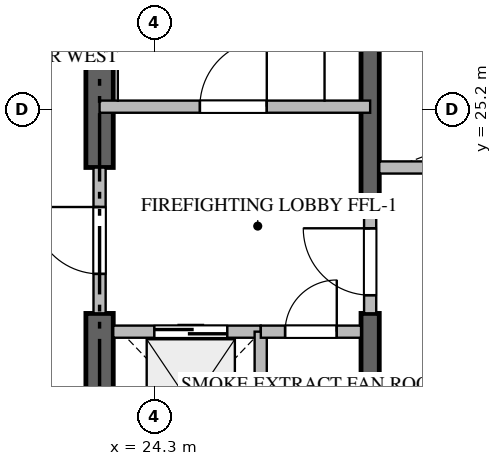
"""IFC4 building model, lengths in metres.
Left out: names, types, materials, properties, quantities, classifications, styles, units other than length and angle.
Written with IfcOpenShell. Run it as: python <this file> out.ifc"""

import sys

from ifc_helpers import new_model, si_unit, direction, frame, frame_2d, origin, place, context, subcontext, project, spatial, rectangle, extrude, source, transform, mapped, element, fill, save


model = new_model("IFC4")
c1 = context("Model", 3, precision=1e-05, world=origin(), true_north=direction((0.0, 1.0)))
c2 = subcontext(c1, "Body", "Model", "MODEL_VIEW")
j1 = project(units=[si_unit("LENGTHUNIT", "METRE"), si_unit("PLANEANGLEUNIT", "RADIAN")], contexts=[c1])
p1 = place(None, origin())
s1 = spatial("IfcSite", under=j1, at=p1, CompositionType="ELEMENT")
p2 = place(p1, origin())
s2 = spatial("IfcBuilding", under=s1, at=p2, CompositionType="ELEMENT")
p3 = place(p2, frame((0.0, 0.0, 37.95)))
s3 = spatial("IfcBuildingStorey", under=s2, at=p3, CompositionType="ELEMENT", Elevation=37.95)
p4 = place(p3, frame((23.4, 17.025, -0.26), z_axis=(0.0, 0.0, 1.0), x_axis=(0.0, 1.0, 0.0)))
e1 = element("IfcWall", 1, at=p4, inside=s3, PredefinedType="SHEAR", context=c2, shape_type="SweptSolid", body=[
    extrude(rectangle(XDim=4.825, YDim=0.45, at=frame_2d((2.413, 0.0))), origin(), (0.0, 0.0, 1.0), 3.748),
])
p5 = place(p3, frame((23.4, 24.25, -0.26), z_axis=(0.0, 0.0, 1.0), x_axis=(0.0, 1.0, 0.0)))
e2 = element("IfcWall", 2, at=p5, inside=s3, PredefinedType="SHEAR", context=c2, shape_type="SweptSolid", body=[
    extrude(rectangle(XDim=9.125, YDim=0.45, at=frame_2d((4.562, 0.0))), origin(), (0.0, 0.0, 1.0), 3.748),
])
p6 = place(p3, frame((27.85, 17.025, -0.26), z_axis=(0.0, 0.0, 1.0), x_axis=(0.0, 1.0, 0.0)))
e3 = element("IfcWall", 3, at=p6, inside=s3, PredefinedType="SHEAR", context=c2, shape_type="SweptSolid", body=[
    extrude(rectangle(XDim=4.825, YDim=0.3, at=frame_2d((2.413, 0.0))), origin(), (0.0, 0.0, 1.0), 3.748),
])
p7 = place(p3, frame((27.85, 23.55, -0.26), z_axis=(0.0, 0.0, 1.0), x_axis=(0.0, 1.0, 0.0)))
e4 = element("IfcWall", 4, at=p7, inside=s3, PredefinedType="SHEAR", context=c2, shape_type="SweptSolid", body=[
    extrude(rectangle(XDim=9.825, YDim=0.3, at=frame_2d((4.913, 0.0))), origin(), (0.0, 0.0, 1.0), 3.748),
])
p8 = place(p3, frame((23.4, 25.25, 0.0), z_axis=(0.0, 0.0, 1.0), x_axis=(1.0, 0.0, 0.0)))
e5 = element("IfcWall", 5, at=p8, inside=s3, PredefinedType="STANDARD", context=c2, shape_type="SweptSolid", body=[
    extrude(rectangle(XDim=4.45, YDim=0.2, at=frame_2d((2.225, 0.0))), origin(), (0.0, 0.0, 1.0), 3.49),
])
p9 = place(p8, frame((1.65, 0.0, 0.0)))
e6 = element("IfcOpeningElement", 6, at=p9, cuts=e5, PredefinedType="OPENING", context=c2, shape_type="SweptSolid", body=[
    extrude(rectangle(XDim=1.1, YDim=2.15, at=frame_2d((0.55, 1.075))), frame((0.0, 0.11, 0.0), z_axis=(0.0, -1.0, 0.0), x_axis=(1.0, 0.0, 0.0)), (0.0, 0.0, 1.0), 0.22),
])
p10 = place(p3, frame((23.625, 21.55, 0.0), z_axis=(0.0, 0.0, 1.0), x_axis=(1.0, 0.0, 0.0)))
e7 = element("IfcWall", 7, at=p10, inside=s3, PredefinedType="STANDARD", context=c2, shape_type="SweptSolid", body=[
    extrude(rectangle(XDim=2.425, YDim=0.2, at=frame_2d((1.212, 0.0))), origin(), (0.0, 0.0, 1.0), 3.49),
])
p11 = place(p10, frame((0.675, 0.0, 0.0)))
e8 = element("IfcOpeningElement", 8, at=p11, cuts=e7, PredefinedType="OPENING", context=c2, shape_type="SweptSolid", body=[
    extrude(rectangle(XDim=1.2, YDim=2.2, at=frame_2d((0.6, 1.1))), frame((0.0, 0.11, 0.0), z_axis=(0.0, -1.0, 0.0), x_axis=(1.0, 0.0, 0.0)), (0.0, 0.0, 1.0), 0.22),
])
p12 = place(p3, frame((28.0, 24.25, 0.0), z_axis=(0.0, 0.0, 1.0), x_axis=(1.0, 0.0, 0.0)))
e9 = element("IfcWall", 9, at=p12, inside=s3, PredefinedType="STANDARD", context=c2, shape_type="SweptSolid", body=[
    extrude(rectangle(XDim=2.425, YDim=0.2, at=frame_2d((1.212, 0.0))), origin(), (0.0, 0.0, 1.0), 3.49),
])
p13 = place(p3, frame((26.05, 19.05, 0.0), z_axis=(0.0, 0.0, 1.0), x_axis=(0.0, 1.0, 0.0)))
e10 = element("IfcWall", 10, at=p13, inside=s3, PredefinedType="STANDARD", context=c2, shape_type="SweptSolid", body=[
    extrude(rectangle(XDim=2.5, YDim=0.2, at=frame_2d((1.25, 0.0))), origin(), (0.0, 0.0, 1.0), 3.49),
])
p14 = place(p3, frame((26.052, 21.55, 0.0), z_axis=(0.0, 0.0, 1.0), x_axis=(1.0, 0.0, 0.0)))
e11 = element("IfcWall", 11, at=p14, inside=s3, PredefinedType="STANDARD", context=c2, shape_type="SweptSolid", body=[
    extrude(rectangle(XDim=1.648, YDim=0.2, at=frame_2d((0.824, 0.0))), origin(), (0.0, 0.0, 1.0), 3.49),
])
p15 = place(p14, frame((0.399, 0.0, 0.0)))
e12 = element("IfcOpeningElement", 12, at=p15, cuts=e11, PredefinedType="OPENING", context=c2, shape_type="SweptSolid", body=[
    extrude(rectangle(XDim=0.85, YDim=2.1, at=frame_2d((0.425, 1.05))), frame((0.0, 0.11, 0.0), z_axis=(0.0, -1.0, 0.0), x_axis=(1.0, 0.0, 0.0)), (0.0, 0.0, 1.0), 0.22),
])
p16 = place(p3, frame((23.4, 21.852, 0.0), z_axis=(0.0, 0.0, 1.0), x_axis=(0.0, 1.0, 0.0)))
e13 = element("IfcWall", 13, at=p16, inside=s3, PredefinedType="STANDARD", context=c2, shape_type="SweptSolid", body=[
    extrude(rectangle(XDim=2.396, YDim=0.2, at=frame_2d((1.198, 0.0))), origin(), (0.0, 0.0, 1.0), 3.49),
])
p17 = place(p16, frame((0.648, 0.0, 0.0)))
e14 = element("IfcOpeningElement", 14, at=p17, cuts=e13, PredefinedType="OPENING", context=c2, shape_type="SweptSolid", body=[
    extrude(rectangle(XDim=1.1, YDim=2.15, at=frame_2d((0.55, 1.075))), frame((0.0, 0.11, 0.0), z_axis=(0.0, -1.0, 0.0), x_axis=(1.0, 0.0, 0.0)), (0.0, 0.0, 1.0), 0.22),
])
p18 = place(p3, frame((27.85, 21.852, 0.0), z_axis=(0.0, 0.0, 1.0), x_axis=(0.0, 1.0, 0.0)))
e15 = element("IfcWall", 15, at=p18, inside=s3, PredefinedType="STANDARD", context=c2, shape_type="SweptSolid", body=[
    extrude(rectangle(XDim=1.696, YDim=0.2, at=frame_2d((0.848, 0.0))), origin(), (0.0, 0.0, 1.0), 3.49),
])
p19 = place(p18, frame((0.298, 0.0, 0.0)))
e16 = element("IfcOpeningElement", 16, at=p19, cuts=e15, PredefinedType="OPENING", context=c2, shape_type="SweptSolid", body=[
    extrude(rectangle(XDim=1.1, YDim=2.15, at=frame_2d((0.55, 1.075))), frame((0.0, 0.11, 0.0), z_axis=(0.0, -1.0, 0.0), x_axis=(1.0, 0.0, 0.0)), (0.0, 0.0, 1.0), 0.22),
])
m1 = source(origin(), c2, "Body", "SweptSolid", [
    extrude(rectangle(XDim=1.1, YDim=2.15, at=frame_2d((0.55, 1.075))), frame((0.0, 0.025, 0.0), z_axis=(0.0, -1.0, 0.0), x_axis=(1.0, 0.0, 0.0)), (0.0, 0.0, 1.0), 0.05),
])
p20 = place(p9, origin())
e17 = element("IfcDoor", 17, at=p20, inside=s3, OperationType="SINGLE_SWING_RIGHT", PredefinedType="DOOR", context=c2, shape_type="MappedRepresentation", body=[
    mapped(m1, transform((0.0, 0.0, 0.0), scale=1.0)),
])
fill(e6, e17)
m2 = source(origin(), c2, "Body", "SweptSolid", [
    extrude(rectangle(XDim=1.2, YDim=2.2, at=frame_2d((0.6, 1.1))), frame((0.0, 0.025, 0.0), z_axis=(0.0, -1.0, 0.0), x_axis=(1.0, 0.0, 0.0)), (0.0, 0.0, 1.0), 0.05),
])
p21 = place(p11, origin())
e18 = element("IfcDoor", 18, at=p21, inside=s3, OperationType="DOUBLE_DOOR_SLIDING", PredefinedType="DOOR", context=c2, shape_type="MappedRepresentation", body=[
    mapped(m2, transform((0.0, 0.0, 0.0), scale=1.0)),
])
fill(e8, e18)
m3 = source(origin(), c2, "Body", "SweptSolid", [
    extrude(rectangle(XDim=0.85, YDim=2.1, at=frame_2d((0.425, 1.05))), frame((0.0, 0.025, 0.0), z_axis=(0.0, -1.0, 0.0), x_axis=(1.0, 0.0, 0.0)), (0.0, 0.0, 1.0), 0.05),
])
p22 = place(p15, origin())
e19 = element("IfcDoor", 19, at=p22, inside=s3, OperationType="SINGLE_SWING_RIGHT", PredefinedType="DOOR", context=c2, shape_type="MappedRepresentation", body=[
    mapped(m3, transform((0.0, 0.0, 0.0), scale=1.0)),
])
fill(e12, e19)
p23 = place(p17, origin())
e20 = element("IfcDoor", 20, at=p23, inside=s3, OperationType="SINGLE_SWING_RIGHT", PredefinedType="DOOR", context=c2, shape_type="MappedRepresentation", body=[
    mapped(m1, transform((0.0, 0.0, 0.0), scale=1.0)),
])
fill(e14, e20)
p24 = place(p19, origin())
e21 = element("IfcDoor", 21, at=p24, inside=s3, OperationType="SINGLE_SWING_RIGHT", PredefinedType="DOOR", context=c2, shape_type="MappedRepresentation", body=[
    mapped(m1, transform((0.0, 0.0, 0.0), scale=1.0)),
])
fill(e16, e21)
save(model, sys.argv[1])
